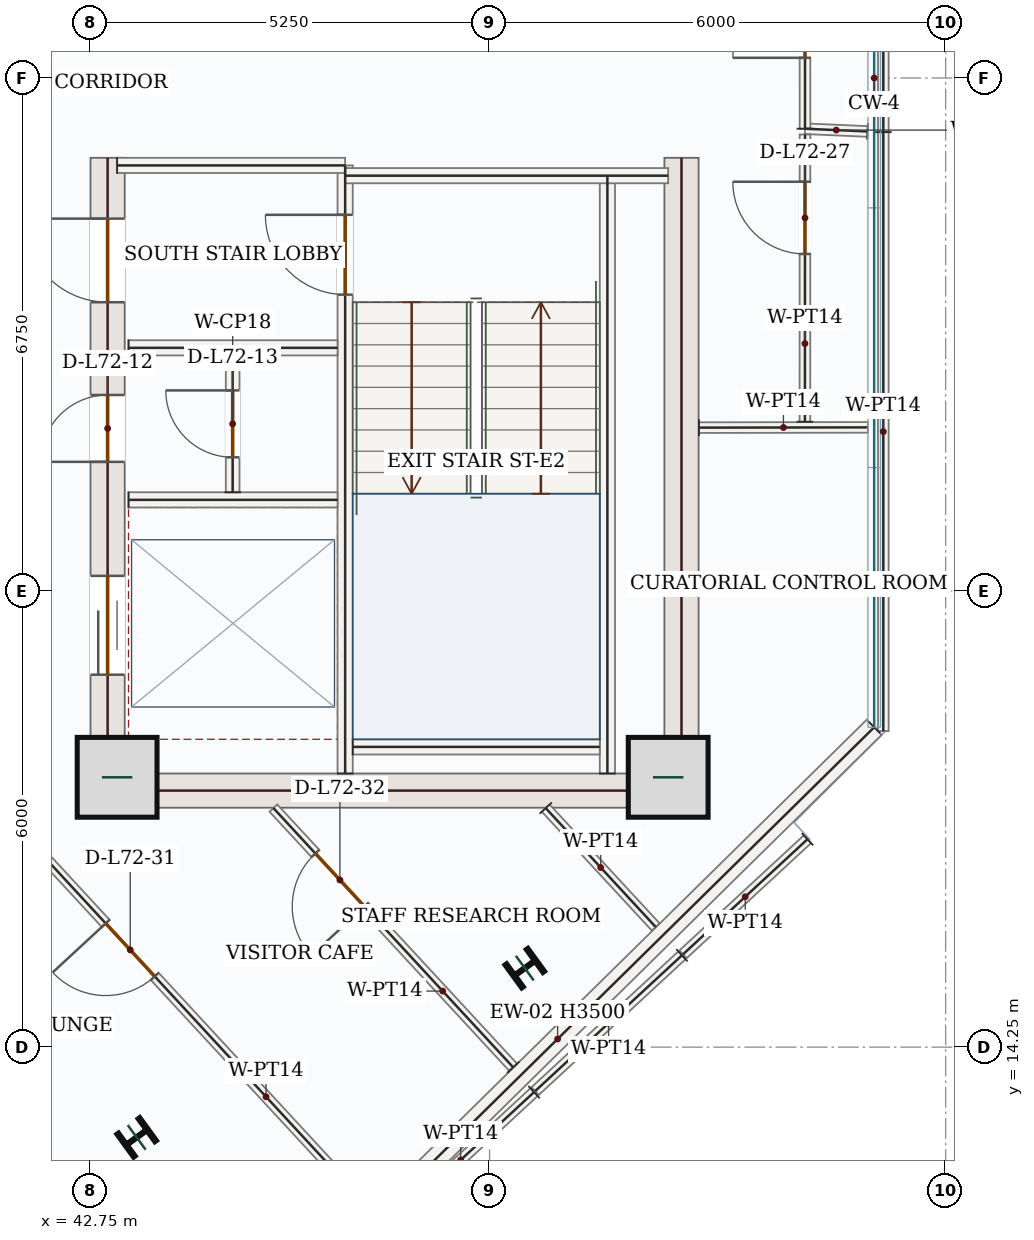
"""IFC4 building model, lengths in metres.
Left out: names, types, materials, properties, quantities, classifications, styles, units other than length and angle.
Written with IfcOpenShell. Run it as: python <this file> out.ifc"""

import sys

from ifc_helpers import new_model, si_unit, direction, frame, frame_2d, origin, origin_2d, place, context, subcontext, project, spatial, rectangle, i_section, extrude, source, transform, mapped, element, fill, save


model = new_model("IFC4")
c1 = context("Model", 3, precision=1e-05, world=origin(), true_north=direction((0.0, 1.0)))
c2 = subcontext(c1, "Body", "Model", "MODEL_VIEW")
j1 = project(units=[si_unit("LENGTHUNIT", "METRE"), si_unit("PLANEANGLEUNIT", "RADIAN")], contexts=[c1])
p1 = place(None, origin())
s1 = spatial("IfcSite", under=j1, at=p1, CompositionType="ELEMENT")
p2 = place(p1, origin())
s2 = spatial("IfcBuilding", under=s1, at=p2, CompositionType="ELEMENT")
p3 = place(p2, frame((0.0, 0.0, 299.1)))
s3 = spatial("IfcBuildingStorey", under=s2, at=p3, CompositionType="ELEMENT", Elevation=299.1)
p4 = place(p3, frame((42.975, 17.4, 0.0), z_axis=(0.0, 0.0, 1.0), x_axis=(0.0, 1.0, 0.0)))
e1 = element("IfcWall", 1, at=p4, inside=s3, PredefinedType="SHEAR", context=c2, shape_type="SweptSolid", body=[
    extrude(rectangle(XDim=8.55, YDim=0.45, at=frame_2d((4.275, 0.0))), origin(), (0.0, 0.0, 1.0), 3.5),
])
p5 = place(p4, frame((6.65, 0.0, 0.0)))
e2 = element("IfcOpeningElement", 2, at=p5, cuts=e1, PredefinedType="OPENING", context=c2, shape_type="SweptSolid", body=[
    extrude(rectangle(XDim=1.1, YDim=2.2, at=frame_2d((0.55, 1.1))), frame((0.0, 0.235, 0.0), z_axis=(0.0, -1.0, 0.0), x_axis=(1.0, 0.0, 0.0)), (0.0, 0.0, 1.0), 0.47),
])
p6 = place(p4, frame((1.75, 0.0, 0.0)))
e3 = element("IfcOpeningElement", 3, at=p6, cuts=e1, PredefinedType="OPENING", context=c2, shape_type="SweptSolid", body=[
    extrude(rectangle(XDim=1.3, YDim=2.2, at=frame_2d((0.65, 1.1))), frame((0.0, 0.235, 0.0), z_axis=(0.0, -1.0, 0.0), x_axis=(1.0, 0.0, 0.0)), (0.0, 0.0, 1.0), 0.47),
])
p7 = place(p4, frame((4.55, 0.0, 0.0)))
e4 = element("IfcOpeningElement", 4, at=p7, cuts=e1, PredefinedType="OPENING", context=c2, shape_type="SweptSolid", body=[
    extrude(rectangle(XDim=0.88, YDim=2.1, at=frame_2d((0.44, 1.05))), frame((0.0, 0.235, 0.0), z_axis=(0.0, -1.0, 0.0), x_axis=(1.0, 0.0, 0.0)), (0.0, 0.0, 1.0), 0.47),
])
m1 = source(origin(), c2, "Body", "SweptSolid", [
    extrude(rectangle(XDim=8.55, YDim=0.45, at=frame_2d((4.275, 0.0))), origin(), (0.0, 0.0, 1.0), 3.5),
])
p8 = place(p3, frame((50.525, 17.4, 0.0), z_axis=(0.0, 0.0, 1.0), x_axis=(0.0, 1.0, 0.0)))
e5 = element("IfcWall", 5, at=p8, inside=s3, PredefinedType="SHEAR", context=c2, shape_type="MappedRepresentation", body=[
    mapped(m1, transform((0.0, 0.0, 0.0), x_axis=(1.0, 0.0, 0.0), y_axis=(0.0, 1.0, 0.0), z_axis=(0.0, 0.0, 1.0), scale=1.0)),
])
m2 = source(origin(), c2, "Body", "SweptSolid", [
    extrude(rectangle(XDim=7.1, YDim=0.45, at=frame_2d((3.55, 0.0))), origin(), (0.0, 0.0, 1.0), 3.5),
])
p9 = place(p3, frame((43.2, 17.625, 0.0), z_axis=(0.0, 0.0, 1.0), x_axis=(1.0, 0.0, 0.0)))
e6 = element("IfcWall", 6, at=p9, inside=s3, PredefinedType="SHEAR", context=c2, shape_type="MappedRepresentation", body=[
    mapped(m2, transform((0.0, 0.0, 0.0), x_axis=(1.0, 0.0, 0.0), y_axis=(0.0, 1.0, 0.0), z_axis=(0.0, 0.0, 1.0), scale=1.0)),
])
m3 = source(origin(), c2, "Body", "SweptSolid", [
    extrude(rectangle(XDim=1.05, YDim=1.05, at=origin_2d()), origin(), (0.0, 0.0, 1.0), 3.75),
])
for number, where, z_axis, x_axis in (
    (7, (43.1, 17.8, 0.0), (0.0, 0.0, 1.0), (1.0, 0.0, 0.0)),
    (8, (50.35, 17.8, 0.0), (0.0, 0.0, 1.0), (1.0, 0.0, 0.0)),
):
    element("IfcColumn", number, at=place(p3, frame(where, z_axis=z_axis, x_axis=x_axis)), inside=s3, PredefinedType="COLUMN", context=c2, shape_type="MappedRepresentation", body=[
        mapped(m3, transform((0.0, 0.0, 0.0), x_axis=(1.0, 0.0, 0.0), y_axis=(0.0, 1.0, 0.0), z_axis=(0.0, 0.0, 1.0), scale=1.0)),
    ])
m4 = source(origin(), c2, "Body", "SweptSolid", [
    extrude(i_section(OverallWidth=0.374, OverallDepth=0.372, WebThickness=0.016, FlangeThickness=0.026, FilletRadius=0.018, at=origin_2d()), origin(), (0.0, 0.0, 1.0), 3.75),
])
for number, where, z_axis, x_axis in (
    (9, (43.357, 13.063, 0.0), (0.0, 0.0, 1.0), (-0.588, 0.809, 0.0)),
    (10, (48.464, 15.289, 0.0), (0.0, 0.0, 1.0), (-0.588, 0.809, 0.0)),
):
    element("IfcColumn", number, at=place(p3, frame(where, z_axis=z_axis, x_axis=x_axis)), inside=s3, PredefinedType="COLUMN", context=c2, shape_type="MappedRepresentation", body=[
        mapped(m4, transform((0.0, 0.0, 0.0), x_axis=(1.0, 0.0, 0.0), y_axis=(0.0, 1.0, 0.0), z_axis=(0.0, 0.0, 1.0), scale=1.0)),
    ])
m5 = source(origin(), c2, "Body", "SweptSolid", [
    extrude(rectangle(XDim=11.69, YDim=0.28, at=frame_2d((5.845, 0.0))), origin(), (0.0, 0.0, 1.0), 3.5),
])
p10 = place(p3, frame((53.06, 18.458, 0.0), z_axis=(0.0, 0.0, 1.0), x_axis=(-0.712557502542, -0.701613715353, 0.0)))
e11 = element("IfcWall", 11, at=p10, inside=s3, PredefinedType="SOLIDWALL", context=c2, shape_type="MappedRepresentation", body=[
    mapped(m5, transform((0.0, 0.0, 0.0), x_axis=(1.0, 0.0, 0.0), y_axis=(0.0, 1.0, 0.0), z_axis=(0.0, 0.0, 1.0), scale=1.0)),
])
p11 = place(p3, frame((42.328, 10.35, 0.0), z_axis=(0.0, 0.0, 1.0), x_axis=(-0.679010627727, 0.734128440693, 0.0)))
e12 = element("IfcWall", 12, at=p11, inside=s3, PredefinedType="SOLIDWALL", context=c2, shape_type="SweptSolid", body=[
    extrude(rectangle(XDim=5.98, YDim=0.28, at=frame_2d((2.99, 0.0))), origin(), (0.0, 0.0, 1.0), 3.5),
])
p12 = place(p11, frame((2.24, 0.0, 0.85)))
e13 = element("IfcOpeningElement", 13, at=p12, cuts=e12, PredefinedType="OPENING", context=c2, shape_type="SweptSolid", body=[
    extrude(rectangle(XDim=1.5, YDim=1.5, at=frame_2d((0.75, 0.75))), frame((0.0, 0.15, 0.0), z_axis=(0.0, -1.0, 0.0), x_axis=(1.0, 0.0, 0.0)), (0.0, 0.0, 1.0), 0.3),
])
m6 = source(origin(), c2, "Body", "SweptSolid", [
    extrude(rectangle(XDim=7.87, YDim=0.2, at=frame_2d((3.935, 0.0))), origin(), (0.0, 0.0, 1.0), 3.5),
])
p13 = place(p3, frame((49.55, 17.85, 0.0), z_axis=(0.0, 0.0, 1.0), x_axis=(0.0, 1.0, 0.0)))
e14 = element("IfcWall", 14, at=p13, inside=s3, PredefinedType="SOLIDWALL", context=c2, shape_type="MappedRepresentation", body=[
    mapped(m6, transform((0.0, 0.0, 0.0), x_axis=(1.0, 0.0, 0.0), y_axis=(0.0, 1.0, 0.0), z_axis=(0.0, 0.0, 1.0), scale=1.0)),
])
p14 = place(p3, frame((46.1, 17.85, 0.0), z_axis=(0.0, 0.0, 1.0), x_axis=(0.0, 1.0, 0.0)))
e15 = element("IfcWall", 15, at=p14, inside=s3, PredefinedType="SOLIDWALL", context=c2, shape_type="SweptSolid", body=[
    extrude(rectangle(XDim=8.0, YDim=0.2, at=frame_2d((4.0, 0.0))), origin(), (0.0, 0.0, 1.0), 3.5),
])
p15 = place(p14, frame((6.3, 0.0, 0.0)))
e16 = element("IfcOpeningElement", 16, at=p15, cuts=e15, PredefinedType="OPENING", context=c2, shape_type="SweptSolid", body=[
    extrude(rectangle(XDim=1.05, YDim=2.15, at=frame_2d((0.525, 1.075))), frame((0.0, 0.11, 0.0), z_axis=(0.0, -1.0, 0.0), x_axis=(1.0, 0.0, 0.0)), (0.0, 0.0, 1.0), 0.22),
])
m7 = source(origin(), c2, "Body", "SweptSolid", [
    extrude(rectangle(XDim=3.0, YDim=0.2, at=frame_2d((1.5, 0.0))), origin(), (0.0, 0.0, 1.0), 3.5),
])
p16 = place(p3, frame((43.1, 25.85, 0.0), z_axis=(0.0, 0.0, 1.0), x_axis=(1.0, 0.0, 0.0)))
e17 = element("IfcWall", 17, at=p16, inside=s3, PredefinedType="SOLIDWALL", context=c2, shape_type="MappedRepresentation", body=[
    mapped(m7, transform((0.0, 0.0, 0.0), x_axis=(1.0, 0.0, 0.0), y_axis=(0.0, 1.0, 0.0), z_axis=(0.0, 0.0, 1.0), scale=1.0)),
])
m8 = source(origin(), c2, "Body", "SweptSolid", [
    extrude(rectangle(XDim=4.25, YDim=0.2, at=frame_2d((2.125, 0.0))), origin(), (0.0, 0.0, 1.0), 3.5),
])
p17 = place(p3, frame((46.1, 25.715, 0.0), z_axis=(0.0, 0.0, 1.0), x_axis=(1.0, 0.0, 0.0)))
e18 = element("IfcWall", 18, at=p17, inside=s3, PredefinedType="SOLIDWALL", context=c2, shape_type="MappedRepresentation", body=[
    mapped(m8, transform((0.0, 0.0, 0.0), x_axis=(1.0, 0.0, 0.0), y_axis=(0.0, 1.0, 0.0), z_axis=(0.0, 0.0, 1.0), scale=1.0)),
])
m9 = source(origin(), c2, "Body", "SweptSolid", [
    extrude(rectangle(XDim=3.25, YDim=0.2, at=frame_2d((1.625, 0.0))), origin(), (0.0, 0.0, 1.0), 3.5),
])
p18 = place(p3, frame((46.2, 18.2, 0.0), z_axis=(0.0, 0.0, 1.0), x_axis=(1.0, 0.0, 0.0)))
e19 = element("IfcWall", 19, at=p18, inside=s3, PredefinedType="SOLIDWALL", context=c2, shape_type="MappedRepresentation", body=[
    mapped(m9, transform((0.0, 0.0, 0.0), x_axis=(1.0, 0.0, 0.0), y_axis=(0.0, 1.0, 0.0), z_axis=(0.0, 0.0, 1.0), scale=1.0)),
])
m10 = source(origin(), c2, "Body", "SweptSolid", [
    extrude(rectangle(XDim=2.75, YDim=0.2, at=frame_2d((1.375, 0.0))), origin(), (0.0, 0.0, 1.0), 3.5),
])
for number, where, z_axis, x_axis in (
    (20, (43.25, 23.45, 0.0), (0.0, 0.0, 1.0), (1.0, 0.0, 0.0)),
    (21, (43.25, 21.45, 0.0), (0.0, 0.0, 1.0), (1.0, 0.0, 0.0)),
):
    element("IfcWall", number, at=place(p3, frame(where, z_axis=z_axis, x_axis=x_axis)), inside=s3, PredefinedType="SOLIDWALL", context=c2, shape_type="MappedRepresentation", body=[
        mapped(m10, transform((0.0, 0.0, 0.0), x_axis=(1.0, 0.0, 0.0), y_axis=(0.0, 1.0, 0.0), z_axis=(0.0, 0.0, 1.0), scale=1.0)),
    ])
p19 = place(p3, frame((44.62, 21.55, 0.0), z_axis=(0.0, 0.0, 1.0), x_axis=(0.0, 1.0, 0.0)))
e22 = element("IfcWall", 22, at=p19, inside=s3, PredefinedType="PARTITIONING", context=c2, shape_type="SweptSolid", body=[
    extrude(rectangle(XDim=1.8, YDim=0.18, at=frame_2d((0.9, 0.0))), origin(), (0.0, 0.0, 1.0), 3.5),
])
p20 = place(p19, frame((0.46, 0.0, 0.0)))
e23 = element("IfcOpeningElement", 23, at=p20, cuts=e22, PredefinedType="OPENING", context=c2, shape_type="SweptSolid", body=[
    extrude(rectangle(XDim=0.88, YDim=2.1, at=frame_2d((0.44, 1.05))), frame((0.0, 0.1, 0.0), z_axis=(0.0, -1.0, 0.0), x_axis=(1.0, 0.0, 0.0)), (0.0, 0.0, 1.0), 0.2),
])
p21 = place(p3, frame((48.311, 13.985, 0.0), z_axis=(0.0, 0.0, 1.0), x_axis=(-0.679002327249, 0.73413611789, 0.0)))
e24 = element("IfcWall", 24, at=p21, inside=s3, PredefinedType="PARTITIONING", context=c2, shape_type="SweptSolid", body=[
    extrude(rectangle(XDim=4.645, YDim=0.14, at=frame_2d((2.323, 0.0))), origin(), (0.0, 0.0, 1.0), 3.5),
])
p22 = place(p21, frame((2.882, 0.0, 0.0)))
e25 = element("IfcOpeningElement", 25, at=p22, cuts=e24, PredefinedType="OPENING", context=c2, shape_type="SweptSolid", body=[
    extrude(rectangle(XDim=0.95, YDim=2.15, at=frame_2d((0.475, 1.075))), frame((0.0, 0.08, 0.0), z_axis=(0.0, -1.0, 0.0), x_axis=(1.0, 0.0, 0.0)), (0.0, 0.0, 1.0), 0.16),
])
m11 = source(origin(), c2, "Body", "SweptSolid", [
    extrude(rectangle(XDim=2.13, YDim=0.14, at=frame_2d((1.065, 0.0))), origin(), (0.0, 0.0, 1.0), 3.5),
])
p23 = place(p3, frame((48.739, 17.395, 0.0), z_axis=(0.0, 0.0, 1.0), x_axis=(0.678946242809, -0.734187986401, 0.0)))
e26 = element("IfcWall", 26, at=p23, inside=s3, PredefinedType="PARTITIONING", context=c2, shape_type="MappedRepresentation", body=[
    mapped(m11, transform((0.0, 0.0, 0.0), x_axis=(1.0, 0.0, 0.0), y_axis=(0.0, 1.0, 0.0), z_axis=(0.0, 0.0, 1.0), scale=1.0)),
])
m12 = source(origin(), c2, "Body", "SweptSolid", [
    extrude(rectangle(XDim=2.63, YDim=0.14, at=frame_2d((1.315, 0.0))), origin(), (0.0, 0.0, 1.0), 3.5),
])
for number, where, z_axis, x_axis in (
    (27, (50.531, 15.458, 0.0), (0.0, 0.0, 1.0), (-0.734, -0.679, 0.0)),
    (28, (48.585, 13.658, 0.0), (0.0, 0.0, 1.0), (-0.734, -0.679, 0.0)),
):
    element("IfcWall", number, at=place(p3, frame(where, z_axis=z_axis, x_axis=x_axis)), inside=s3, PredefinedType="PARTITIONING", context=c2, shape_type="MappedRepresentation", body=[
        mapped(m12, transform((0.0, 0.0, 0.0), x_axis=(1.0, 0.0, 0.0), y_axis=(0.0, 1.0, 0.0), z_axis=(0.0, 0.0, 1.0), scale=1.0)),
    ])
p24 = place(p3, frame((46.421, 12.125, 0.0), z_axis=(0.0, 0.0, 1.0), x_axis=(-0.679016867794, 0.734122669076, 0.0)))
e29 = element("IfcWall", 29, at=p24, inside=s3, PredefinedType="PARTITIONING", context=c2, shape_type="SweptSolid", body=[
    extrude(rectangle(XDim=6.287, YDim=0.14, at=frame_2d((3.143, 0.0))), origin(), (0.0, 0.0, 1.0), 3.5),
])
p25 = place(p24, frame((4.163, 0.0, 0.0)))
e30 = element("IfcOpeningElement", 30, at=p25, cuts=e29, PredefinedType="OPENING", context=c2, shape_type="SweptSolid", body=[
    extrude(rectangle(XDim=0.95, YDim=2.15, at=frame_2d((0.475, 1.075))), frame((0.0, 0.08, 0.0), z_axis=(0.0, -1.0, 0.0), x_axis=(1.0, 0.0, 0.0)), (0.0, 0.0, 1.0), 0.16),
])
m13 = source(origin(), c2, "Body", "SweptSolid", [
    extrude(rectangle(XDim=9.304, YDim=0.14, at=frame_2d((4.652, 0.0))), origin(), (0.0, 0.0, 1.0), 3.5),
])
p26 = place(p3, frame((53.18, 35.592, 0.0), z_axis=(0.0, 0.0, 1.0), x_axis=(0.0, -1.0, 0.0)))
e31 = element("IfcWall", 31, at=p26, inside=s3, PredefinedType="PARTITIONING", context=c2, shape_type="MappedRepresentation", body=[
    mapped(m13, transform((0.0, 0.0, 0.0), x_axis=(1.0, 0.0, 0.0), y_axis=(0.0, 1.0, 0.0), z_axis=(0.0, 0.0, 1.0), scale=1.0)),
])
m14 = source(origin(), c2, "Body", "SweptSolid", [
    extrude(rectangle(XDim=0.823, YDim=0.14, at=frame_2d((0.412, 0.0))), origin(), (0.0, 0.0, 1.0), 3.5),
])
p27 = place(p3, frame((52.972, 26.297, 0.0), z_axis=(0.0, 0.0, 1.0), x_axis=(-0.999049432265, 0.043591649315, 0.0)))
e32 = element("IfcWall", 32, at=p27, inside=s3, PredefinedType="PARTITIONING", context=c2, shape_type="MappedRepresentation", body=[
    mapped(m14, transform((0.0, 0.0, 0.0), x_axis=(1.0, 0.0, 0.0), y_axis=(0.0, 1.0, 0.0), z_axis=(0.0, 0.0, 1.0), scale=1.0)),
])
p28 = place(p3, frame((52.15, 26.333, 0.0), z_axis=(0.0, 0.0, 1.0), x_axis=(-0.000188111359, 0.999999982307, 0.0)))
e33 = element("IfcWall", 33, at=p28, inside=s3, PredefinedType="PARTITIONING", context=c2, shape_type="SweptSolid", body=[
    extrude(rectangle(XDim=5.191, YDim=0.14, at=frame_2d((2.596, 0.0))), origin(), (0.0, 0.0, 1.0), 3.5),
])
p29 = place(p28, frame((0.933, 0.0, 0.0)))
e34 = element("IfcOpeningElement", 34, at=p29, cuts=e33, PredefinedType="OPENING", context=c2, shape_type="SweptSolid", body=[
    extrude(rectangle(XDim=0.95, YDim=2.15, at=frame_2d((0.475, 1.075))), frame((0.0, 0.08, 0.0), z_axis=(0.0, -1.0, 0.0), x_axis=(1.0, 0.0, 0.0)), (0.0, 0.0, 1.0), 0.16),
])
m15 = source(origin(), c2, "Body", "SweptSolid", [
    extrude(rectangle(XDim=2.223, YDim=0.14, at=frame_2d((1.111, 0.0))), origin(), (0.0, 0.0, 1.0), 3.5),
])
p30 = place(p3, frame((50.755, 22.4, 0.0), z_axis=(0.0, 0.0, 1.0), x_axis=(0.99999881761, 0.00153778377, 0.0)))
e35 = element("IfcWall", 35, at=p30, inside=s3, PredefinedType="PARTITIONING", context=c2, shape_type="MappedRepresentation", body=[
    mapped(m15, transform((0.0, 0.0, 0.0), x_axis=(1.0, 0.0, 0.0), y_axis=(0.0, 1.0, 0.0), z_axis=(0.0, 0.0, 1.0), scale=1.0)),
])
p31 = place(p3, frame((52.149, 22.477, 0.0), z_axis=(0.0, 0.0, 1.0), x_axis=(0.000322913959, 0.999999947863, 0.0)))
e36 = element("IfcWall", 36, at=p31, inside=s3, PredefinedType="PARTITIONING", context=c2, shape_type="SweptSolid", body=[
    extrude(rectangle(XDim=3.78, YDim=0.14, at=frame_2d((1.89, 0.0))), origin(), (0.0, 0.0, 1.0), 3.5),
])
p32 = place(p31, frame((2.208, 0.0, 0.0)))
e37 = element("IfcOpeningElement", 37, at=p32, cuts=e36, PredefinedType="OPENING", context=c2, shape_type="SweptSolid", body=[
    extrude(rectangle(XDim=0.95, YDim=2.15, at=frame_2d((0.475, 1.075))), frame((0.0, 0.08, 0.0), z_axis=(0.0, -1.0, 0.0), x_axis=(1.0, 0.0, 0.0)), (0.0, 0.0, 1.0), 0.16),
])
m16 = source(origin(), c2, "Body", "SweptSolid", [
    extrude(rectangle(XDim=7.879, YDim=0.14, at=frame_2d((3.94, 0.0))), origin(), (0.0, 0.0, 1.0), 3.5),
])
p33 = place(p3, frame((53.18, 26.288, 0.0), z_axis=(0.0, 0.0, 1.0), x_axis=(0.0, -1.0, 0.0)))
e38 = element("IfcWall", 38, at=p33, inside=s3, PredefinedType="PARTITIONING", context=c2, shape_type="MappedRepresentation", body=[
    mapped(m16, transform((0.0, 0.0, 0.0), x_axis=(1.0, 0.0, 0.0), y_axis=(0.0, 1.0, 0.0), z_axis=(0.0, 0.0, 1.0), scale=1.0)),
])
m17 = source(origin(), c2, "Body", "SweptSolid", [
    extrude(rectangle(XDim=2.229, YDim=0.14, at=frame_2d((1.115, 0.0))), origin(), (0.0, 0.0, 1.0), 3.5),
])
p34 = place(p3, frame((52.182, 16.985, 0.0), z_axis=(0.0, 0.0, 1.0), x_axis=(-0.734110356631, -0.679030179217, 0.0)))
e39 = element("IfcWall", 39, at=p34, inside=s3, PredefinedType="PARTITIONING", context=c2, shape_type="MappedRepresentation", body=[
    mapped(m17, transform((0.0, 0.0, 0.0), x_axis=(1.0, 0.0, 0.0), y_axis=(0.0, 1.0, 0.0), z_axis=(0.0, 0.0, 1.0), scale=1.0)),
])
m18 = source(origin(), c2, "Body", "SweptSolid", [
    extrude(rectangle(XDim=1.05, YDim=2.15, at=frame_2d((0.525, 1.075))), frame((0.0, 0.025, 0.0), z_axis=(0.0, -1.0, 0.0), x_axis=(1.0, 0.0, 0.0)), (0.0, 0.0, 1.0), 0.05),
])
p35 = place(p15, origin())
e40 = element("IfcDoor", 40, at=p35, inside=s3, OperationType="SINGLE_SWING_RIGHT", PredefinedType="DOOR", context=c2, shape_type="MappedRepresentation", body=[
    mapped(m18, transform((0.0, 0.0, 0.0), x_axis=(1.0, 0.0, 0.0), y_axis=(0.0, 1.0, 0.0), z_axis=(0.0, 0.0, 1.0), scale=1.0)),
])
fill(e16, e40)
m19 = source(origin(), c2, "Body", "SweptSolid", [
    extrude(rectangle(XDim=1.1, YDim=2.2, at=frame_2d((0.55, 1.1))), frame((0.0, 0.025, 0.0), z_axis=(0.0, -1.0, 0.0), x_axis=(1.0, 0.0, 0.0)), (0.0, 0.0, 1.0), 0.05),
])
p36 = place(p5, origin())
e41 = element("IfcDoor", 41, at=p36, inside=s3, OperationType="SINGLE_SWING_RIGHT", PredefinedType="DOOR", context=c2, shape_type="MappedRepresentation", body=[
    mapped(m19, transform((0.0, 0.0, 0.0), x_axis=(1.0, 0.0, 0.0), y_axis=(0.0, 1.0, 0.0), z_axis=(0.0, 0.0, 1.0), scale=1.0)),
])
fill(e2, e41)
m20 = source(origin(), c2, "Body", "SweptSolid", [
    extrude(rectangle(XDim=1.3, YDim=2.2, at=frame_2d((0.65, 1.1))), frame((0.0, 0.025, 0.0), z_axis=(0.0, -1.0, 0.0), x_axis=(1.0, 0.0, 0.0)), (0.0, 0.0, 1.0), 0.05),
])
p37 = place(p6, origin())
e42 = element("IfcDoor", 42, at=p37, inside=s3, OperationType="DOUBLE_DOOR_SLIDING", PredefinedType="DOOR", context=c2, shape_type="MappedRepresentation", body=[
    mapped(m20, transform((0.0, 0.0, 0.0), x_axis=(1.0, 0.0, 0.0), y_axis=(0.0, 1.0, 0.0), z_axis=(0.0, 0.0, 1.0), scale=1.0)),
])
fill(e3, e42)
m21 = source(origin(), c2, "Body", "SweptSolid", [
    extrude(rectangle(XDim=0.88, YDim=2.1, at=frame_2d((0.44, 1.05))), frame((0.0, 0.025, 0.0), z_axis=(0.0, -1.0, 0.0), x_axis=(1.0, 0.0, 0.0)), (0.0, 0.0, 1.0), 0.05),
])
p38 = place(p7, origin())
e43 = element("IfcDoor", 43, at=p38, inside=s3, OperationType="SINGLE_SWING_LEFT", PredefinedType="DOOR", context=c2, shape_type="MappedRepresentation", body=[
    mapped(m21, transform((0.0, 0.0, 0.0), x_axis=(1.0, 0.0, 0.0), y_axis=(0.0, 1.0, 0.0), z_axis=(0.0, 0.0, 1.0), scale=1.0)),
])
fill(e4, e43)
p39 = place(p20, origin())
e44 = element("IfcDoor", 44, at=p39, inside=s3, OperationType="SINGLE_SWING_RIGHT", PredefinedType="DOOR", context=c2, shape_type="MappedRepresentation", body=[
    mapped(m21, transform((0.0, 0.0, 0.0), x_axis=(1.0, 0.0, 0.0), y_axis=(0.0, 1.0, 0.0), z_axis=(0.0, 0.0, 1.0), scale=1.0)),
])
fill(e23, e44)
m22 = source(origin(), c2, "Body", "SweptSolid", [
    extrude(rectangle(XDim=0.95, YDim=2.15, at=frame_2d((0.475, 1.075))), frame((0.0, 0.025, 0.0), z_axis=(0.0, -1.0, 0.0), x_axis=(1.0, 0.0, 0.0)), (0.0, 0.0, 1.0), 0.05),
])
p40 = place(p29, origin())
e45 = element("IfcDoor", 45, at=p40, inside=s3, OperationType="SINGLE_SWING_LEFT", PredefinedType="DOOR", context=c2, shape_type="MappedRepresentation", body=[
    mapped(m22, transform((0.0, 0.0, 0.0), x_axis=(1.0, 0.0, 0.0), y_axis=(0.0, 1.0, 0.0), z_axis=(0.0, 0.0, 1.0), scale=1.0)),
])
fill(e34, e45)
p41 = place(p32, origin())
e46 = element("IfcDoor", 46, at=p41, inside=s3, OperationType="SINGLE_SWING_RIGHT", PredefinedType="DOOR", context=c2, shape_type="MappedRepresentation", body=[
    mapped(m22, transform((0.0, 0.0, 0.0), x_axis=(1.0, 0.0, 0.0), y_axis=(0.0, 1.0, 0.0), z_axis=(0.0, 0.0, 1.0), scale=1.0)),
])
fill(e37, e46)
p42 = place(p25, origin())
e47 = element("IfcDoor", 47, at=p42, inside=s3, OperationType="SINGLE_SWING_RIGHT", PredefinedType="DOOR", context=c2, shape_type="MappedRepresentation", body=[
    mapped(m22, transform((0.0, 0.0, 0.0), x_axis=(1.0, 0.0, 0.0), y_axis=(0.0, 1.0, 0.0), z_axis=(0.0, 0.0, 1.0), scale=1.0)),
])
fill(e30, e47)
p43 = place(p22, origin())
e48 = element("IfcDoor", 48, at=p43, inside=s3, OperationType="SINGLE_SWING_LEFT", PredefinedType="DOOR", context=c2, shape_type="MappedRepresentation", body=[
    mapped(m22, transform((0.0, 0.0, 0.0), x_axis=(1.0, 0.0, 0.0), y_axis=(0.0, 1.0, 0.0), z_axis=(0.0, 0.0, 1.0), scale=1.0)),
])
fill(e25, e48)
save(model, sys.argv[1])
